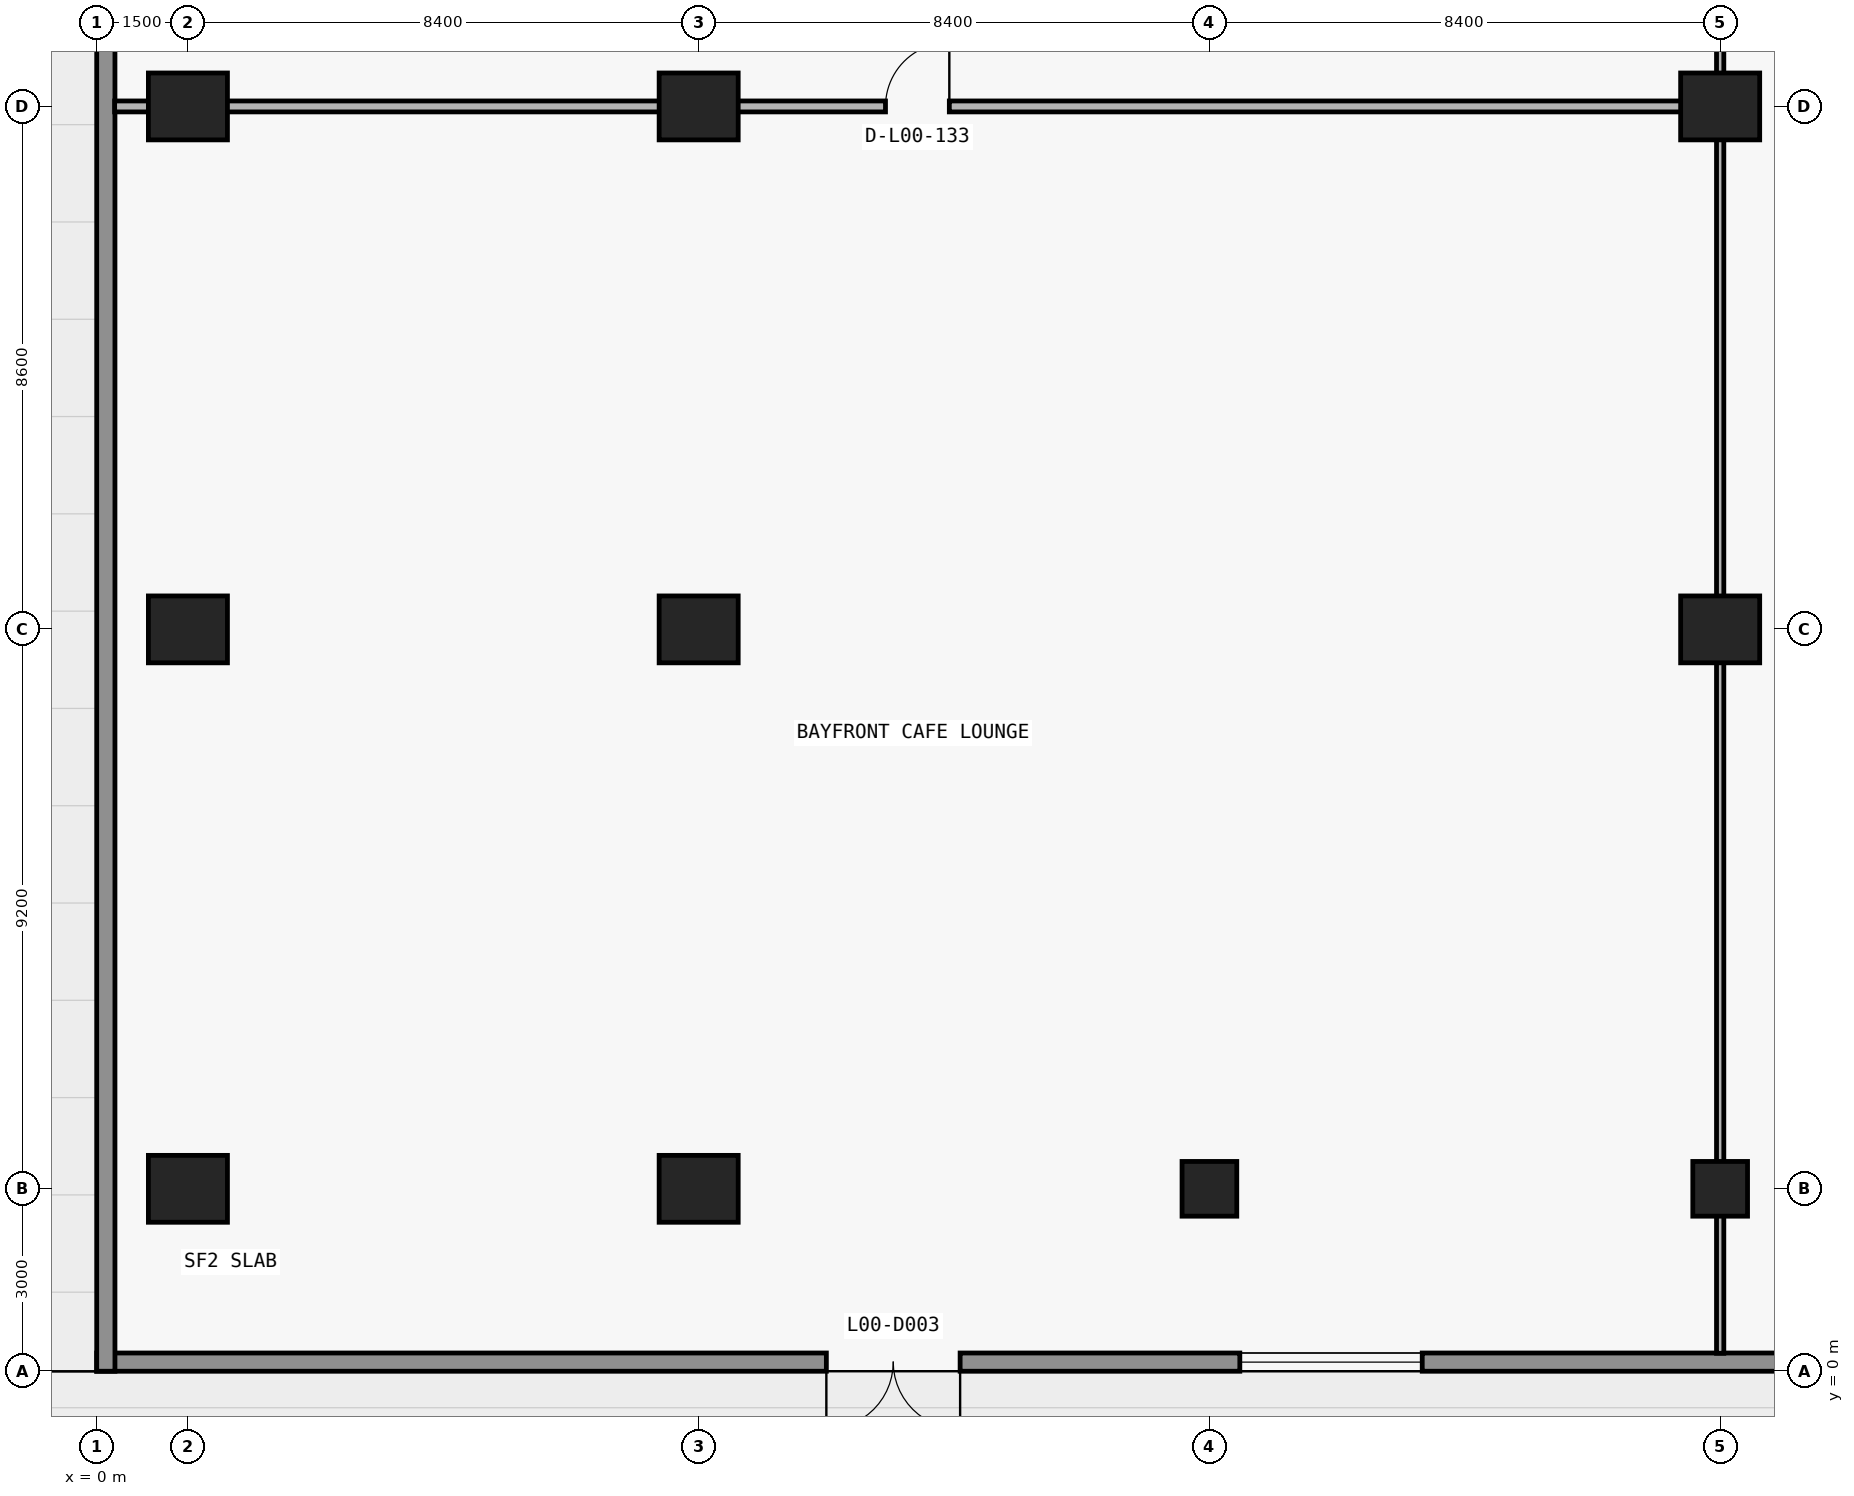
"""IFC4 building model, lengths in metres.
Left out: names, types, materials, properties, quantities, classifications, styles, units other than length and angle.
Written with IfcOpenShell. Run it as: python <this file> out.ifc"""

import sys

from ifc_helpers import new_model, si_unit, direction, frame, frame_2d, origin, origin_2d, place, context, subcontext, project, spatial, rectangle, circle, extrude, element, fill, save


model = new_model("IFC4")
c1 = context("Model", 3, precision=1e-05, world=origin(), true_north=direction((0.0, 1.0)))
c2 = subcontext(c1, "Body", "Model", "MODEL_VIEW")
j1 = project(units=[si_unit("LENGTHUNIT", "METRE"), si_unit("PLANEANGLEUNIT", "RADIAN")], contexts=[c1])
p1 = place(None, origin())
s1 = spatial("IfcSite", under=j1, at=p1, CompositionType="ELEMENT")
p2 = place(p1, origin())
s2 = spatial("IfcBuilding", under=s1, at=p2, CompositionType="ELEMENT")
p3 = place(p2, origin())
s3 = spatial("IfcBuildingStorey", under=s2, at=p3, CompositionType="ELEMENT", Elevation=0.0)
for number, where, z_axis, x_axis in (
    (1, (1.5, 3.0, 0.0), (0.0, 0.0, 1.0), (1.0, 0.0, 0.0)),
    (2, (9.9, 3.0, 0.0), (0.0, 0.0, 1.0), (1.0, 0.0, 0.0)),
):
    element("IfcColumn", number, at=place(p3, frame(where, z_axis=z_axis, x_axis=x_axis)), inside=s3, PredefinedType="COLUMN", context=c2, shape_type="SweptSolid", body=[
        extrude(rectangle(XDim=1.3, YDim=1.1, at=origin_2d()), origin(), (0.0, 0.0, 1.0), 5.1),
    ])
for number, where, z_axis, x_axis in (
    (3, (18.3, 3.0, 0.0), (0.0, 0.0, 1.0), (1.0, 0.0, 0.0)),
    (4, (26.7, 3.0, 0.0), (0.0, 0.0, 1.0), (1.0, 0.0, 0.0)),
):
    element("IfcColumn", number, at=place(p3, frame(where, z_axis=z_axis, x_axis=x_axis)), inside=s3, PredefinedType="COLUMN", context=c2, shape_type="SweptSolid", body=[
        extrude(circle(Radius=0.45, at=origin_2d()), origin(), (0.0, 0.0, 1.0), 5.1),
    ])
for number, where, z_axis, x_axis in (
    (5, (1.5, 12.2, 0.0), (0.0, 0.0, 1.0), (1.0, 0.0, 0.0)),
    (6, (9.9, 12.2, 0.0), (0.0, 0.0, 1.0), (1.0, 0.0, 0.0)),
    (7, (26.7, 12.2, 0.0), (0.0, 0.0, 1.0), (1.0, 0.0, 0.0)),
    (8, (1.5, 20.8, 0.0), (0.0, 0.0, 1.0), (1.0, 0.0, 0.0)),
    (9, (9.9, 20.8, 0.0), (0.0, 0.0, 1.0), (1.0, 0.0, 0.0)),
    (10, (26.7, 20.8, 0.0), (0.0, 0.0, 1.0), (1.0, 0.0, 0.0)),
):
    element("IfcColumn", number, at=place(p3, frame(where, z_axis=z_axis, x_axis=x_axis)), inside=s3, PredefinedType="COLUMN", context=c2, shape_type="SweptSolid", body=[
        extrude(rectangle(XDim=1.3, YDim=1.1, at=origin_2d()), origin(), (0.0, 0.0, 1.0), 5.1),
    ])
p4 = place(p3, frame((77.8, 0.15, 0.0), z_axis=(0.0, 0.0, 1.0), x_axis=(-1.0, 0.0, 0.0)))
e11 = element("IfcWall", 11, at=p4, inside=s3, PredefinedType="STANDARD", context=c2, shape_type="SweptSolid", body=[
    extrude(rectangle(XDim=77.8, YDim=0.3, at=frame_2d((38.9, 0.0))), origin(), (0.0, 0.0, 1.0), 5.1),
])
p5 = place(p4, frame((2.6, 0.0, 0.0)))
e12 = element("IfcOpeningElement", 12, at=p5, cuts=e11, PredefinedType="OPENING", context=c2, shape_type="SweptSolid", body=[
    extrude(rectangle(XDim=3.6, YDim=3.8, at=frame_2d((1.8, 1.9))), frame((0.0, 0.16, 0.0), z_axis=(0.0, -1.0, 0.0), x_axis=(1.0, 0.0, 0.0)), (0.0, 0.0, 1.0), 0.32),
])
p6 = place(p4, frame((17.6, 0.0, 0.0)))
e13 = element("IfcOpeningElement", 13, at=p6, cuts=e11, PredefinedType="OPENING", context=c2, shape_type="SweptSolid", body=[
    extrude(rectangle(XDim=2.2, YDim=2.6, at=frame_2d((1.1, 1.3))), frame((0.0, 0.16, 0.0), z_axis=(0.0, -1.0, 0.0), x_axis=(1.0, 0.0, 0.0)), (0.0, 0.0, 1.0), 0.32),
])
p7 = place(p4, frame((12.0, 0.0, 0.6)))
e14 = element("IfcOpeningElement", 14, at=p7, cuts=e11, PredefinedType="OPENING", context=c2, shape_type="SweptSolid", body=[
    extrude(rectangle(XDim=3.0, YDim=2.4, at=frame_2d((1.5, 1.2))), frame((0.0, 0.16, 0.0), z_axis=(0.0, -1.0, 0.0), x_axis=(1.0, 0.0, 0.0)), (0.0, 0.0, 1.0), 0.32),
])
p8 = place(p4, frame((33.6, 0.0, 0.0)))
e15 = element("IfcOpeningElement", 15, at=p8, cuts=e11, PredefinedType="OPENING", context=c2, shape_type="SweptSolid", body=[
    extrude(rectangle(XDim=2.2, YDim=2.6, at=frame_2d((1.1, 1.3))), frame((0.0, 0.16, 0.0), z_axis=(0.0, -1.0, 0.0), x_axis=(1.0, 0.0, 0.0)), (0.0, 0.0, 1.0), 0.32),
])
p9 = place(p4, frame((42.0, 0.0, 0.0)))
e16 = element("IfcOpeningElement", 16, at=p9, cuts=e11, PredefinedType="OPENING", context=c2, shape_type="SweptSolid", body=[
    extrude(rectangle(XDim=2.2, YDim=2.6, at=frame_2d((1.1, 1.3))), frame((0.0, 0.16, 0.0), z_axis=(0.0, -1.0, 0.0), x_axis=(1.0, 0.0, 0.0)), (0.0, 0.0, 1.0), 0.32),
])
p10 = place(p4, frame((37.4, 0.0, 0.6)))
e17 = element("IfcOpeningElement", 17, at=p10, cuts=e11, PredefinedType="OPENING", context=c2, shape_type="SweptSolid", body=[
    extrude(rectangle(XDim=3.0, YDim=2.4, at=frame_2d((1.5, 1.2))), frame((0.0, 0.16, 0.0), z_axis=(0.0, -1.0, 0.0), x_axis=(1.0, 0.0, 0.0)), (0.0, 0.0, 1.0), 0.32),
])
p11 = place(p4, frame((63.6, 0.0, 0.0)))
e18 = element("IfcOpeningElement", 18, at=p11, cuts=e11, PredefinedType="OPENING", context=c2, shape_type="SweptSolid", body=[
    extrude(rectangle(XDim=2.2, YDim=2.6, at=frame_2d((1.1, 1.3))), frame((0.0, 0.16, 0.0), z_axis=(0.0, -1.0, 0.0), x_axis=(1.0, 0.0, 0.0)), (0.0, 0.0, 1.0), 0.32),
])
p12 = place(p4, frame((56.0, 0.0, 0.6)))
e19 = element("IfcOpeningElement", 19, at=p12, cuts=e11, PredefinedType="OPENING", context=c2, shape_type="SweptSolid", body=[
    extrude(rectangle(XDim=3.0, YDim=2.4, at=frame_2d((1.5, 1.2))), frame((0.0, 0.16, 0.0), z_axis=(0.0, -1.0, 0.0), x_axis=(1.0, 0.0, 0.0)), (0.0, 0.0, 1.0), 0.32),
])
p13 = place(p3, frame((0.15, 0.0, 0.0), z_axis=(0.0, 0.0, 1.0), x_axis=(0.0, 1.0, 0.0)))
e20 = element("IfcWall", 20, at=p13, inside=s3, PredefinedType="STANDARD", context=c2, shape_type="SweptSolid", body=[
    extrude(rectangle(XDim=53.8, YDim=0.3, at=frame_2d((26.9, 0.0))), origin(), (0.0, 0.0, 1.0), 5.1),
])
p14 = place(p13, frame((39.5, 0.0, 0.0)))
e21 = element("IfcOpeningElement", 21, at=p14, cuts=e20, PredefinedType="OPENING", context=c2, shape_type="SweptSolid", body=[
    extrude(rectangle(XDim=1.4, YDim=2.2, at=frame_2d((0.7, 1.1))), frame((0.0, 0.16, 0.0), z_axis=(0.0, -1.0, 0.0), x_axis=(1.0, 0.0, 0.0)), (0.0, 0.0, 1.0), 0.32),
])
p15 = place(p13, frame((45.8, 0.0, 0.0)))
e22 = element("IfcOpeningElement", 22, at=p15, cuts=e20, PredefinedType="OPENING", context=c2, shape_type="SweptSolid", body=[
    extrude(rectangle(XDim=1.4, YDim=2.2, at=frame_2d((0.7, 1.1))), frame((0.0, 0.16, 0.0), z_axis=(0.0, -1.0, 0.0), x_axis=(1.0, 0.0, 0.0)), (0.0, 0.0, 1.0), 0.32),
])
p16 = place(p13, frame((49.0, 0.0, 0.0)))
e23 = element("IfcOpeningElement", 23, at=p16, cuts=e20, PredefinedType="OPENING", context=c2, shape_type="SweptSolid", body=[
    extrude(rectangle(XDim=1.4, YDim=2.2, at=frame_2d((0.7, 1.1))), frame((0.0, 0.16, 0.0), z_axis=(0.0, -1.0, 0.0), x_axis=(1.0, 0.0, 0.0)), (0.0, 0.0, 1.0), 0.32),
])
p17 = place(p3, frame((26.7, 0.295, 0.0), z_axis=(0.0, 0.0, 1.0), x_axis=(0.0, 1.0, 0.0)))
e24 = element("IfcWall", 24, at=p17, inside=s3, PredefinedType="PARTITIONING", context=c2, shape_type="SweptSolid", body=[
    extrude(rectangle(XDim=33.705, YDim=0.12, at=frame_2d((16.853, 0.0))), origin(), (0.0, 0.0, 1.0), 4.064),
])
p18 = place(p3, frame((0.295, 20.8, 0.0), z_axis=(0.0, 0.0, 1.0), x_axis=(1.0, 0.0, 0.0)))
e25 = element("IfcWall", 25, at=p18, inside=s3, PredefinedType="PARTITIONING", context=c2, shape_type="SweptSolid", body=[
    extrude(rectangle(XDim=26.405, YDim=0.18, at=frame_2d((13.203, 0.0))), origin(), (0.0, 0.0, 1.0), 4.064),
])
p19 = place(p18, frame((12.677, 0.0, 0.0)))
e26 = element("IfcOpeningElement", 26, at=p19, cuts=e25, PredefinedType="OPENING", context=c2, shape_type="SweptSolid", body=[
    extrude(rectangle(XDim=1.05, YDim=2.15, at=frame_2d((0.525, 1.075))), frame((0.0, 0.1, 0.0), z_axis=(0.0, -1.0, 0.0), x_axis=(1.0, 0.0, 0.0)), (0.0, 0.0, 1.0), 0.2),
])
p20 = place(p11, origin())
e27 = element("IfcDoor", 27, at=p20, inside=s3, OperationType="DOUBLE_DOOR_SINGLE_SWING", PredefinedType="DOOR", context=c2, shape_type="SweptSolid", body=[
    extrude(rectangle(XDim=2.2, YDim=2.6, at=frame_2d((1.1, 1.3))), frame((0.0, 0.025, 0.0), z_axis=(0.0, -1.0, 0.0), x_axis=(1.0, 0.0, 0.0)), (0.0, 0.0, 1.0), 0.05),
])
fill(e18, e27)
p21 = place(p12, origin())
e28 = element("IfcWindow", 28, at=p21, inside=s3, PartitioningType="SINGLE_PANEL", PredefinedType="WINDOW", context=c2, shape_type="SweptSolid", body=[
    extrude(rectangle(XDim=3.0, YDim=2.4, at=frame_2d((1.5, 1.2))), frame((0.0, 0.03, 0.0), z_axis=(0.0, -1.0, 0.0), x_axis=(1.0, 0.0, 0.0)), (0.0, 0.0, 1.0), 0.06),
])
fill(e19, e28)
p22 = place(p19, origin())
e29 = element("IfcDoor", 29, at=p22, inside=s3, OperationType="SINGLE_SWING_RIGHT", PredefinedType="DOOR", context=c2, shape_type="SweptSolid", body=[
    extrude(rectangle(XDim=1.05, YDim=2.15, at=frame_2d((0.525, 1.075))), frame((0.0, 0.025, 0.0), z_axis=(0.0, -1.0, 0.0), x_axis=(1.0, 0.0, 0.0)), (0.0, 0.0, 1.0), 0.05),
])
fill(e26, e29)
save(model, sys.argv[1])
